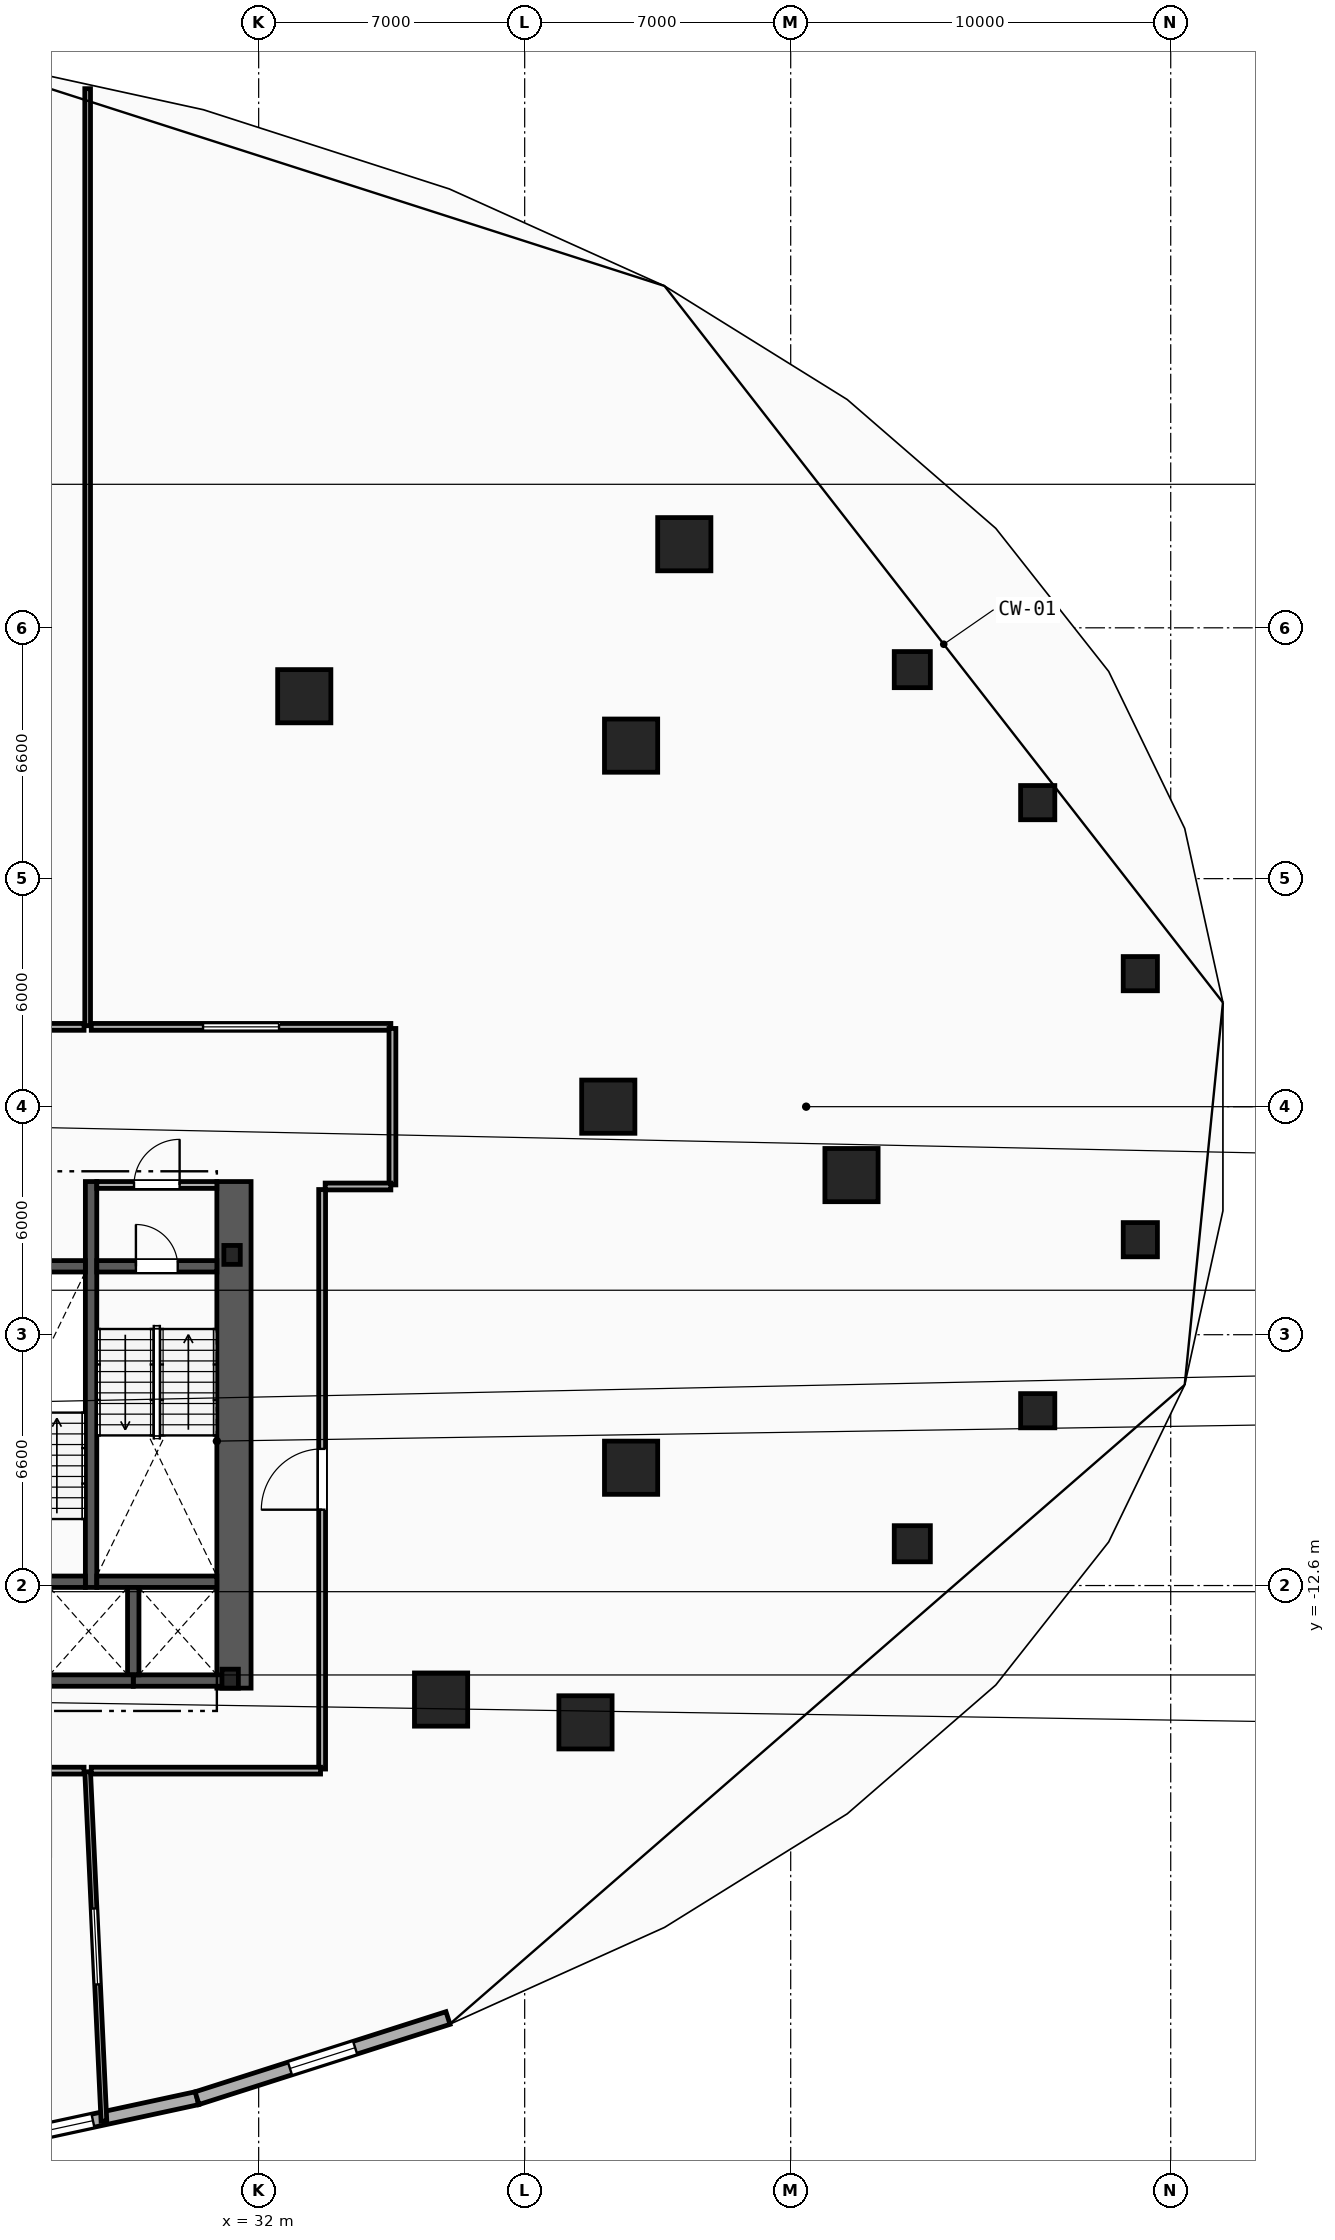
"""IFC4 building model, lengths in metres.
Left out: names, types, materials, properties, quantities, classifications, styles, units other than length and angle.
Written with IfcOpenShell. Run it as: python <this file> out.ifc"""

import sys

from ifc_helpers import new_model, si_unit, direction, frame, frame_2d, origin, origin_2d, place, context, subcontext, project, spatial, rectangle, circle, i_section, extrude, element, fill, save


model = new_model("IFC4")
c1 = context("Model", 3, precision=1e-05, world=origin(), true_north=direction((0.0, 1.0)))
c2 = subcontext(c1, "Body", "Model", "MODEL_VIEW")
j1 = project(units=[si_unit("LENGTHUNIT", "METRE"), si_unit("PLANEANGLEUNIT", "RADIAN")], contexts=[c1])
p1 = place(None, origin())
s1 = spatial("IfcSite", under=j1, at=p1, CompositionType="ELEMENT")
p2 = place(p1, origin())
s2 = spatial("IfcBuilding", under=s1, at=p2, CompositionType="ELEMENT")
p3 = place(p2, frame((0.0, 0.0, 12.0)))
s3 = spatial("IfcBuildingStorey", under=s2, at=p3, CompositionType="ELEMENT", Elevation=12.0)
for number, where, z_axis, x_axis in (
    (1, (31.3, -3.9, 0.0), (0.0, 0.0, 1.0), (1.0, 0.0, 0.0)),
    (2, (31.25, -15.05, 0.0), (0.0, 0.0, 1.0), (1.0, 0.0, 0.0)),
):
    element("IfcColumn", number, at=place(p3, frame(where, z_axis=z_axis, x_axis=x_axis)), inside=s3, PredefinedType="COLUMN", context=c2, shape_type="SweptSolid", body=[
        extrude(i_section(OverallWidth=0.432, OverallDepth=0.498, WebThickness=0.056, FlangeThickness=0.089, FilletRadius=0.018, at=origin_2d()), origin(), (0.0, 0.0, 1.0), 4.0),
    ])
for number, where, z_axis, x_axis in (
    (3, (41.2, 0.0, 0.0), (0.0, 0.0, 1.0), (1.0, 0.0, 0.0)),
    (4, (41.8, -9.5, 0.0), (0.0, 0.0, 1.0), (1.0, 0.0, 0.0)),
    (5, (36.8, -15.6, 0.0), (0.0, 0.0, 1.0), (1.0, 0.0, 0.0)),
    (6, (41.8, 9.5, 0.0), (0.0, 0.0, 1.0), (1.0, 0.0, 0.0)),
    (7, (33.2, 10.8, 0.0), (0.0, 0.0, 1.0), (1.0, 0.0, 0.0)),
    (8, (40.6, -16.2, 0.0), (0.0, 0.0, 1.0), (1.0, 0.0, 0.0)),
    (9, (47.6, -1.8, 0.0), (0.0, 0.0, 1.0), (1.0, 0.0, 0.0)),
    (10, (43.2, 14.8, 0.0), (0.0, 0.0, 1.0), (1.0, 0.0, 0.0)),
):
    element("IfcColumn", number, at=place(p3, frame(where, z_axis=z_axis, x_axis=x_axis)), inside=s3, PredefinedType="COLUMN", context=c2, shape_type="SweptSolid", body=[
        extrude(rectangle(XDim=1.4, YDim=1.4, at=origin_2d()), origin(), (0.0, 0.0, 1.0), 4.0),
    ])
for number, where, z_axis, x_axis in (
    (11, (49.2, 11.5, 0.0), (0.0, 0.0, 1.0), (1.0, 0.0, 0.0)),
    (12, (49.2, -11.5, 0.0), (0.0, 0.0, 1.0), (1.0, 0.0, 0.0)),
):
    element("IfcColumn", number, at=place(p3, frame(where, z_axis=z_axis, x_axis=x_axis)), inside=s3, PredefinedType="PILASTER", context=c2, shape_type="SweptSolid", body=[
        extrude(circle(Radius=0.475, at=origin_2d()), origin(), (0.0, 0.0, 1.0), 4.0),
    ])
for number, where, z_axis, x_axis in (
    (13, (52.5, -8.0, -1.5), (0.0, 0.0, 1.0), (1.0, 0.0, 0.0)),
    (14, (52.5, 8.0, -1.5), (0.0, 0.0, 1.0), (1.0, 0.0, 0.0)),
    (15, (55.2, -3.5, -1.5), (0.0, 0.0, 1.0), (1.0, 0.0, 0.0)),
    (16, (55.2, 3.5, -1.5), (0.0, 0.0, 1.0), (1.0, 0.0, 0.0)),
):
    element("IfcColumn", number, at=place(p3, frame(where, z_axis=z_axis, x_axis=x_axis)), inside=s3, PredefinedType="COLUMN", context=c2, shape_type="SweptSolid", body=[
        extrude(rectangle(XDim=0.9, YDim=0.9, at=origin_2d()), origin(), (0.0, 0.0, 1.0), 4.5),
    ])
p4 = place(p3, frame((23.14, -27.652, 0.0), z_axis=(0.0, 0.0, 1.0), x_axis=(0.977456656467, 0.211136175795, 0.0)))
e17 = element("IfcWall", 17, at=p4, inside=s3, PredefinedType="SOLIDWALL", context=c2, shape_type="SweptSolid", body=[
    extrude(rectangle(XDim=7.406, YDim=0.35, at=frame_2d((3.703, 0.0))), origin(), (0.0, 0.0, 1.0), 3.65),
])
p5 = place(p4, frame((2.803, 0.0, 0.85)))
e18 = element("IfcOpeningElement", 18, at=p5, cuts=e17, PredefinedType="OPENING", context=c2, shape_type="SweptSolid", body=[
    extrude(rectangle(XDim=1.8, YDim=2.4, at=frame_2d((0.9, 1.2))), frame((0.0, 0.185, 0.0), z_axis=(0.0, -1.0, 0.0), x_axis=(1.0, 0.0, 0.0)), (0.0, 0.0, 1.0), 0.37),
])
p6 = place(p3, frame((30.379, -26.089, 0.0), z_axis=(0.0, 0.0, 1.0), x_axis=(0.952587993211, 0.304263233385, 0.0)))
e19 = element("IfcWall", 19, at=p6, inside=s3, PredefinedType="SOLIDWALL", context=c2, shape_type="SweptSolid", body=[
    extrude(rectangle(XDim=6.932, YDim=0.35, at=frame_2d((3.466, 0.0))), origin(), (0.0, 0.0, 1.0), 3.65),
])
p7 = place(p6, frame((2.566, 0.0, 0.85)))
e20 = element("IfcOpeningElement", 20, at=p7, cuts=e19, PredefinedType="OPENING", context=c2, shape_type="SweptSolid", body=[
    extrude(rectangle(XDim=1.8, YDim=2.4, at=frame_2d((0.9, 1.2))), frame((0.0, 0.185, 0.0), z_axis=(0.0, -1.0, 0.0), x_axis=(1.0, 0.0, 0.0)), (0.0, 0.0, 1.0), 0.37),
])
p8 = place(p3, frame((31.35, -15.3, 0.0), z_axis=(0.0, 0.0, 1.0), x_axis=(0.0, 1.0, 0.0)))
e21 = element("IfcWall", 21, at=p8, inside=s3, PredefinedType="SHEAR", context=c2, shape_type="SweptSolid", body=[
    extrude(rectangle(XDim=13.33, YDim=0.9, at=frame_2d((6.665, 0.0))), origin(), (0.0, 0.0, 1.0), 3.65),
])
p9 = place(p3, frame((27.59, -12.65, 0.0), z_axis=(0.0, 0.0, 1.0), x_axis=(0.0, 1.0, 0.0)))
e22 = element("IfcWall", 22, at=p9, inside=s3, PredefinedType="SHEAR", context=c2, shape_type="SweptSolid", body=[
    extrude(rectangle(XDim=10.68, YDim=0.3, at=frame_2d((5.34, 0.0))), origin(), (0.0, 0.0, 1.0), 3.65),
])
p10 = place(p3, frame((27.74, -4.2, 0.0), z_axis=(0.0, 0.0, 1.0), x_axis=(1.0, 0.0, 0.0)))
e23 = element("IfcWall", 23, at=p10, inside=s3, PredefinedType="SHEAR", context=c2, shape_type="SweptSolid", body=[
    extrude(rectangle(XDim=3.16, YDim=0.3, at=frame_2d((1.58, 0.0))), origin(), (0.0, 0.0, 1.0), 3.65),
])
p11 = place(p10, frame((1.03, 0.0, 0.0)))
e24 = element("IfcOpeningElement", 24, at=p11, cuts=e23, PredefinedType="OPENING", context=c2, shape_type="SweptSolid", body=[
    extrude(rectangle(XDim=1.1, YDim=2.15, at=frame_2d((0.55, 1.075))), frame((0.0, 0.16, 0.0), z_axis=(0.0, -1.0, 0.0), x_axis=(1.0, 0.0, 0.0)), (0.0, 0.0, 1.0), 0.32),
])
p12 = place(p3, frame((27.74, -12.5, 0.0), z_axis=(0.0, 0.0, 1.0), x_axis=(1.0, 0.0, 0.0)))
e25 = element("IfcWall", 25, at=p12, inside=s3, PredefinedType="SHEAR", context=c2, shape_type="SweptSolid", body=[
    extrude(rectangle(XDim=3.16, YDim=0.3, at=frame_2d((1.58, 0.0))), origin(), (0.0, 0.0, 1.0), 3.65),
])
p13 = place(p3, frame((24.28, -12.5, 0.0), z_axis=(0.0, 0.0, 1.0), x_axis=(1.0, 0.0, 0.0)))
e26 = element("IfcWall", 26, at=p13, inside=s3, PredefinedType="SHEAR", context=c2, shape_type="SweptSolid", body=[
    extrude(rectangle(XDim=3.16, YDim=0.3, at=frame_2d((1.58, 0.0))), origin(), (0.0, 0.0, 1.0), 3.65),
])
p14 = place(p13, frame((1.03, 0.0, 0.0)))
e27 = element("IfcOpeningElement", 27, at=p14, cuts=e26, PredefinedType="OPENING", context=c2, shape_type="SweptSolid", body=[
    extrude(rectangle(XDim=1.1, YDim=2.15, at=frame_2d((0.55, 1.075))), frame((0.0, 0.16, 0.0), z_axis=(0.0, -1.0, 0.0), x_axis=(1.0, 0.0, 0.0)), (0.0, 0.0, 1.0), 0.32),
])
p15 = place(p3, frame((24.28, -4.2, 0.0), z_axis=(0.0, 0.0, 1.0), x_axis=(1.0, 0.0, 0.0)))
e28 = element("IfcWall", 28, at=p15, inside=s3, PredefinedType="SHEAR", context=c2, shape_type="SweptSolid", body=[
    extrude(rectangle(XDim=3.16, YDim=0.3, at=frame_2d((1.58, 0.0))), origin(), (0.0, 0.0, 1.0), 3.65),
])
p16 = place(p3, frame((27.74, -2.06, 0.0), z_axis=(0.0, 0.0, 1.0), x_axis=(1.0, 0.0, 0.0)))
e29 = element("IfcWall", 29, at=p16, inside=s3, PredefinedType="PARTITIONING", context=c2, shape_type="SweptSolid", body=[
    extrude(rectangle(XDim=3.16, YDim=0.18, at=frame_2d((1.58, 0.0))), origin(), (0.0, 0.0, 1.0), 3.65),
])
p17 = place(p16, frame((0.98, 0.0, 0.0)))
e30 = element("IfcOpeningElement", 30, at=p17, cuts=e29, PredefinedType="OPENING", context=c2, shape_type="SweptSolid", body=[
    extrude(rectangle(XDim=1.2, YDim=2.15, at=frame_2d((0.6, 1.075))), frame((0.0, 0.1, 0.0), z_axis=(0.0, -1.0, 0.0), x_axis=(1.0, 0.0, 0.0)), (0.0, 0.0, 1.0), 0.2),
])
p18 = place(p3, frame((28.7, -15.1, 0.0), z_axis=(0.0, 0.0, 1.0), x_axis=(1.0, 0.0, 0.0)))
e31 = element("IfcWall", 31, at=p18, inside=s3, PredefinedType="SHEAR", context=c2, shape_type="SweptSolid", body=[
    extrude(rectangle(XDim=2.5, YDim=0.3, at=frame_2d((1.25, 0.0))), origin(), (0.0, 0.0, 1.0), 3.65),
])
p19 = place(p3, frame((28.7, -14.95, 0.0), z_axis=(0.0, 0.0, 1.0), x_axis=(0.0, 1.0, 0.0)))
e32 = element("IfcWall", 32, at=p19, inside=s3, PredefinedType="SHEAR", context=c2, shape_type="SweptSolid", body=[
    extrude(rectangle(XDim=2.3, YDim=0.3, at=frame_2d((1.15, 0.0))), origin(), (0.0, 0.0, 1.0), 3.65),
])
p20 = place(p3, frame((26.2, -15.1, 0.0), z_axis=(0.0, 0.0, 1.0), x_axis=(1.0, 0.0, 0.0)))
e33 = element("IfcWall", 33, at=p20, inside=s3, PredefinedType="SHEAR", context=c2, shape_type="SweptSolid", body=[
    extrude(rectangle(XDim=2.5, YDim=0.3, at=frame_2d((1.25, 0.0))), origin(), (0.0, 0.0, 1.0), 3.65),
])
p21 = place(p3, frame((27.928, -26.694, 0.0), z_axis=(0.0, 0.0, 1.0), x_axis=(-0.046527880698, 0.998916991705, 0.0)))
e34 = element("IfcWall", 34, at=p21, inside=s3, PredefinedType="PARTITIONING", context=c2, shape_type="SweptSolid", body=[
    extrude(rectangle(XDim=9.204, YDim=0.15, at=frame_2d((4.602, 0.0))), origin(), (0.0, 0.0, 1.0), 3.65),
])
p22 = place(p21, frame((3.602, 0.0, 1.05)))
e35 = element("IfcOpeningElement", 35, at=p22, cuts=e34, PredefinedType="OPENING", context=c2, shape_type="SweptSolid", body=[
    extrude(rectangle(XDim=2.0, YDim=1.5, at=frame_2d((1.0, 0.75))), frame((0.0, 0.085, 0.0), z_axis=(0.0, -1.0, 0.0), x_axis=(1.0, 0.0, 0.0)), (0.0, 0.0, 1.0), 0.17),
])
p23 = place(p3, frame((27.5, 2.13, 0.0), z_axis=(0.0, 0.0, 1.0), x_axis=(0.0, 1.0, 0.0)))
e36 = element("IfcWall", 36, at=p23, inside=s3, PredefinedType="PARTITIONING", context=c2, shape_type="SweptSolid", body=[
    extrude(rectangle(XDim=24.656, YDim=0.15, at=frame_2d((12.328, 0.0))), origin(), (0.0, 0.0, 1.0), 3.65),
])
p24 = place(p3, frame((16.822, -17.47, 0.0), z_axis=(0.0, 0.0, 1.0), x_axis=(1.0, 0.0, 0.0)))
e37 = element("IfcWall", 37, at=p24, inside=s3, PredefinedType="PARTITIONING", context=c2, shape_type="SweptSolid", body=[
    extrude(rectangle(XDim=10.583, YDim=0.18, at=frame_2d((5.292, 0.0))), origin(), (0.0, 0.0, 1.0), 3.65),
])
p25 = place(p24, frame((4.492, 0.0, 0.0)))
e38 = element("IfcOpeningElement", 38, at=p25, cuts=e37, PredefinedType="OPENING", context=c2, shape_type="SweptSolid", body=[
    extrude(rectangle(XDim=1.6, YDim=2.2, at=frame_2d((0.8, 1.1))), frame((0.0, 0.1, 0.0), z_axis=(0.0, -1.0, 0.0), x_axis=(1.0, 0.0, 0.0)), (0.0, 0.0, 1.0), 0.2),
])
p26 = place(p3, frame((33.67, -17.428, 0.0), z_axis=(0.0, 0.0, 1.0), x_axis=(0.0, 1.0, 0.0)))
e39 = element("IfcWall", 39, at=p26, inside=s3, PredefinedType="PARTITIONING", context=c2, shape_type="SweptSolid", body=[
    extrude(rectangle(XDim=15.249, YDim=0.18, at=frame_2d((7.624, 0.0))), origin(), (0.0, 0.0, 1.0), 3.65),
])
p27 = place(p26, frame((6.824, 0.0, 0.0)))
e40 = element("IfcOpeningElement", 40, at=p27, cuts=e39, PredefinedType="OPENING", context=c2, shape_type="SweptSolid", body=[
    extrude(rectangle(XDim=1.6, YDim=2.2, at=frame_2d((0.8, 1.1))), frame((0.0, 0.1, 0.0), z_axis=(0.0, -1.0, 0.0), x_axis=(1.0, 0.0, 0.0)), (0.0, 0.0, 1.0), 0.2),
])
p28 = place(p3, frame((35.479, 2.1, 0.0), z_axis=(0.0, 0.0, 1.0), x_axis=(-1.0, 0.0, 0.0)))
e41 = element("IfcWall", 41, at=p28, inside=s3, PredefinedType="PARTITIONING", context=c2, shape_type="SweptSolid", body=[
    extrude(rectangle(XDim=7.884, YDim=0.18, at=frame_2d((3.942, 0.0))), origin(), (0.0, 0.0, 1.0), 3.65),
])
p29 = place(p28, frame((2.942, 0.0, 1.05)))
e42 = element("IfcOpeningElement", 42, at=p29, cuts=e41, PredefinedType="OPENING", context=c2, shape_type="SweptSolid", body=[
    extrude(rectangle(XDim=2.0, YDim=1.5, at=frame_2d((1.0, 0.75))), frame((0.0, 0.1, 0.0), z_axis=(0.0, -1.0, 0.0), x_axis=(1.0, 0.0, 0.0)), (0.0, 0.0, 1.0), 0.2),
])
p30 = place(p3, frame((27.595, -17.47, 0.0), z_axis=(0.0, 0.0, 1.0), x_axis=(1.0, 0.0, 0.0)))
e43 = element("IfcWall", 43, at=p30, inside=s3, PredefinedType="PARTITIONING", context=c2, shape_type="SweptSolid", body=[
    extrude(rectangle(XDim=6.033, YDim=0.18, at=frame_2d((3.017, 0.0))), origin(), (0.0, 0.0, 1.0), 2.877),
])
p31 = place(p3, frame((35.52, -2.059, 0.0), z_axis=(0.0, 0.0, 1.0), x_axis=(0.0, 1.0, 0.0)))
e44 = element("IfcWall", 44, at=p31, inside=s3, PredefinedType="PARTITIONING", context=c2, shape_type="SweptSolid", body=[
    extrude(rectangle(XDim=4.117, YDim=0.18, at=frame_2d((2.059, 0.0))), origin(), (0.0, 0.0, 1.0), 3.65),
])
p32 = place(p3, frame((33.75, -2.1, 0.0), z_axis=(0.0, 0.0, 1.0), x_axis=(1.0, 0.0, 0.0)))
e45 = element("IfcWall", 45, at=p32, inside=s3, PredefinedType="PARTITIONING", context=c2, shape_type="SweptSolid", body=[
    extrude(rectangle(XDim=1.729, YDim=0.18, at=frame_2d((0.864, 0.0))), origin(), (0.0, 0.0, 1.0), 3.65),
])
p33 = place(p3, frame((27.405, 2.1, 0.0), z_axis=(0.0, 0.0, 1.0), x_axis=(-1.0, 0.0, 0.0)))
e46 = element("IfcWall", 46, at=p33, inside=s3, PredefinedType="PARTITIONING", context=c2, shape_type="SweptSolid", body=[
    extrude(rectangle(XDim=10.805, YDim=0.18, at=frame_2d((5.402, 0.0))), origin(), (0.0, 0.0, 1.0), 3.65),
])
p34 = place(p33, frame((4.402, 0.0, 1.05)))
e47 = element("IfcOpeningElement", 47, at=p34, cuts=e46, PredefinedType="OPENING", context=c2, shape_type="SweptSolid", body=[
    extrude(rectangle(XDim=2.0, YDim=1.5, at=frame_2d((1.0, 0.75))), frame((0.0, 0.1, 0.0), z_axis=(0.0, -1.0, 0.0), x_axis=(1.0, 0.0, 0.0)), (0.0, 0.0, 1.0), 0.2),
])
p35 = place(p5, origin())
e48 = element("IfcWindow", 48, at=p35, inside=s3, PartitioningType="SINGLE_PANEL", PredefinedType="WINDOW", context=c2, shape_type="SweptSolid", body=[
    extrude(rectangle(XDim=1.8, YDim=2.4, at=frame_2d((0.9, 1.2))), frame((0.0, 0.03, 0.0), z_axis=(0.0, -1.0, 0.0), x_axis=(1.0, 0.0, 0.0)), (0.0, 0.0, 1.0), 0.06),
])
fill(e18, e48)
p36 = place(p7, origin())
e49 = element("IfcWindow", 49, at=p36, inside=s3, PartitioningType="SINGLE_PANEL", PredefinedType="WINDOW", context=c2, shape_type="SweptSolid", body=[
    extrude(rectangle(XDim=1.8, YDim=2.4, at=frame_2d((0.9, 1.2))), frame((0.0, 0.03, 0.0), z_axis=(0.0, -1.0, 0.0), x_axis=(1.0, 0.0, 0.0)), (0.0, 0.0, 1.0), 0.06),
])
fill(e20, e49)
p37 = place(p11, origin())
e50 = element("IfcDoor", 50, at=p37, inside=s3, OperationType="SINGLE_SWING_LEFT", PredefinedType="DOOR", context=c2, shape_type="SweptSolid", body=[
    extrude(rectangle(XDim=1.1, YDim=2.15, at=frame_2d((0.55, 1.075))), frame((0.0, 0.025, 0.0), z_axis=(0.0, -1.0, 0.0), x_axis=(1.0, 0.0, 0.0)), (0.0, 0.0, 1.0), 0.05),
])
fill(e24, e50)
p38 = place(p17, origin())
e51 = element("IfcDoor", 51, at=p38, inside=s3, OperationType="SINGLE_SWING_RIGHT", PredefinedType="DOOR", context=c2, shape_type="SweptSolid", body=[
    extrude(rectangle(XDim=1.2, YDim=2.15, at=frame_2d((0.6, 1.075))), frame((0.0, 0.025, 0.0), z_axis=(0.0, -1.0, 0.0), x_axis=(1.0, 0.0, 0.0)), (0.0, 0.0, 1.0), 0.05),
])
fill(e30, e51)
p39 = place(p27, origin())
e52 = element("IfcDoor", 52, at=p39, inside=s3, OperationType="SINGLE_SWING_LEFT", PredefinedType="DOOR", context=c2, shape_type="SweptSolid", body=[
    extrude(rectangle(XDim=1.6, YDim=2.2, at=frame_2d((0.8, 1.1))), frame((0.0, 0.025, 0.0), z_axis=(0.0, -1.0, 0.0), x_axis=(1.0, 0.0, 0.0)), (0.0, 0.0, 1.0), 0.05),
])
fill(e40, e52)
p40 = place(p22, origin())
e53 = element("IfcWindow", 53, at=p40, inside=s3, PartitioningType="SINGLE_PANEL", PredefinedType="WINDOW", context=c2, shape_type="SweptSolid", body=[
    extrude(rectangle(XDim=2.0, YDim=1.5, at=frame_2d((1.0, 0.75))), frame((0.0, 0.03, 0.0), z_axis=(0.0, -1.0, 0.0), x_axis=(1.0, 0.0, 0.0)), (0.0, 0.0, 1.0), 0.06),
])
fill(e35, e53)
p41 = place(p29, origin())
e54 = element("IfcWindow", 54, at=p41, inside=s3, PartitioningType="SINGLE_PANEL", PredefinedType="WINDOW", context=c2, shape_type="SweptSolid", body=[
    extrude(rectangle(XDim=2.0, YDim=1.5, at=frame_2d((1.0, 0.75))), frame((0.0, 0.03, 0.0), z_axis=(0.0, -1.0, 0.0), x_axis=(1.0, 0.0, 0.0)), (0.0, 0.0, 1.0), 0.06),
])
fill(e42, e54)
save(model, sys.argv[1])
